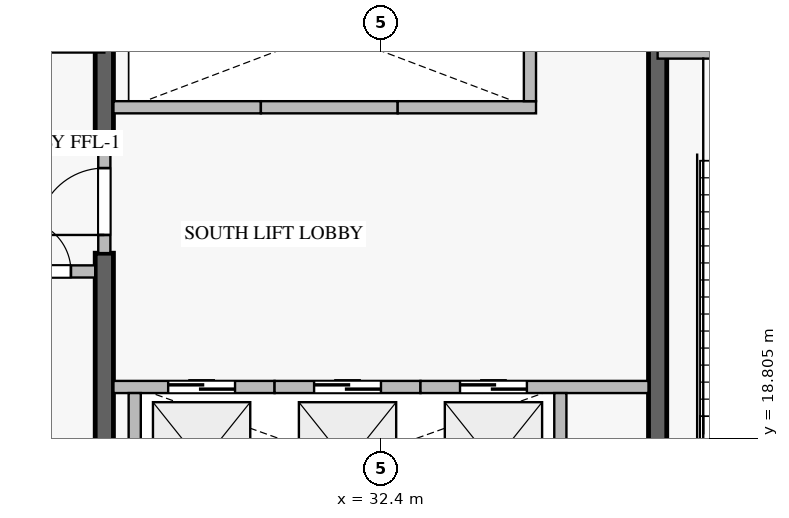
"""IFC4 building model, lengths in metres.
Left out: names, types, materials, properties, quantities, classifications, styles, units other than length and angle.
Written with IfcOpenShell. Run it as: python <this file> out.ifc"""

import sys

from ifc_helpers import new_model, si_unit, direction, frame, frame_2d, origin, place, context, subcontext, project, spatial, rectangle, extrude, source, transform, mapped, element, fill, save


model = new_model("IFC4")
c1 = context("Model", 3, precision=1e-05, world=origin(), true_north=direction((0.0, 1.0)))
c2 = subcontext(c1, "Body", "Model", "MODEL_VIEW")
j1 = project(units=[si_unit("LENGTHUNIT", "METRE"), si_unit("PLANEANGLEUNIT", "RADIAN")], contexts=[c1])
p1 = place(None, origin())
s1 = spatial("IfcSite", under=j1, at=p1, CompositionType="ELEMENT")
p2 = place(p1, origin())
s2 = spatial("IfcBuilding", under=s1, at=p2, CompositionType="ELEMENT")
p3 = place(p2, frame((0.0, 0.0, 109.2)))
s3 = spatial("IfcBuildingStorey", under=s2, at=p3, CompositionType="ELEMENT", Elevation=109.2)
p4 = place(p3, frame((27.85, 17.025, -0.36), z_axis=(0.0, 0.0, 1.0), x_axis=(0.0, 1.0, 0.0)))
e1 = element("IfcWall", 1, at=p4, inside=s3, PredefinedType="SHEAR", context=c2, shape_type="SweptSolid", body=[
    extrude(rectangle(XDim=4.825, YDim=0.3, at=frame_2d((2.413, 0.0))), origin(), (0.0, 0.0, 1.0), 5.998),
])
p5 = place(p3, frame((27.85, 23.55, -0.36), z_axis=(0.0, 0.0, 1.0), x_axis=(0.0, 1.0, 0.0)))
e2 = element("IfcWall", 2, at=p5, inside=s3, PredefinedType="SHEAR", context=c2, shape_type="SweptSolid", body=[
    extrude(rectangle(XDim=9.825, YDim=0.3, at=frame_2d((4.913, 0.0))), origin(), (0.0, 0.0, 1.0), 5.998),
])
p6 = place(p3, frame((36.95, 17.025, -0.36), z_axis=(0.0, 0.0, 1.0), x_axis=(0.0, 1.0, 0.0)))
e3 = element("IfcWall", 3, at=p6, inside=s3, PredefinedType="SHEAR", context=c2, shape_type="SweptSolid", body=[
    extrude(rectangle(XDim=8.325, YDim=0.3, at=frame_2d((4.163, 0.0))), origin(), (0.0, 0.0, 1.0), 5.998),
])
p7 = place(p3, frame((36.95, 25.15, 0.0), z_axis=(0.0, 0.0, 1.0), x_axis=(1.0, 0.0, 0.0)))
e4 = element("IfcWall", 4, at=p7, inside=s3, PredefinedType="STANDARD", context=c2, shape_type="SweptSolid", body=[
    extrude(rectangle(XDim=4.45, YDim=0.2, at=frame_2d((2.225, 0.0))), origin(), (0.0, 0.0, 1.0), 5.64),
])
p8 = place(p7, frame((1.65, 0.0, 0.0)))
e5 = element("IfcOpeningElement", 5, at=p8, cuts=e4, PredefinedType="OPENING", context=c2, shape_type="SweptSolid", body=[
    extrude(rectangle(XDim=1.1, YDim=2.15, at=frame_2d((0.55, 1.075))), frame((0.0, 0.11, 0.0), z_axis=(0.0, -1.0, 0.0), x_axis=(1.0, 0.0, 0.0)), (0.0, 0.0, 1.0), 0.22),
])
p9 = place(p3, frame((28.0, 19.65, 0.0), z_axis=(0.0, 0.0, 1.0), x_axis=(1.0, 0.0, 0.0)))
e6 = element("IfcWall", 6, at=p9, inside=s3, PredefinedType="STANDARD", context=c2, shape_type="SweptSolid", body=[
    extrude(rectangle(XDim=2.65, YDim=0.2, at=frame_2d((1.325, 0.0))), origin(), (0.0, 0.0, 1.0), 5.64),
])
p10 = place(p9, frame((0.9, 0.0, 0.0)))
e7 = element("IfcOpeningElement", 7, at=p10, cuts=e6, PredefinedType="OPENING", context=c2, shape_type="SweptSolid", body=[
    extrude(rectangle(XDim=1.1, YDim=2.2, at=frame_2d((0.55, 1.1))), frame((0.0, 0.11, 0.0), z_axis=(0.0, -1.0, 0.0), x_axis=(1.0, 0.0, 0.0)), (0.0, 0.0, 1.0), 0.22),
])
p11 = place(p3, frame((28.35, 17.025, 0.0), z_axis=(0.0, 0.0, 1.0), x_axis=(0.0, 1.0, 0.0)))
e8 = element("IfcWall", 8, at=p11, inside=s3, PredefinedType="STANDARD", context=c2, shape_type="SweptSolid", body=[
    extrude(rectangle(XDim=2.525, YDim=0.2, at=frame_2d((1.263, 0.0))), origin(), (0.0, 0.0, 1.0), 5.64),
])
p12 = place(p3, frame((30.65, 19.65, 0.0), z_axis=(0.0, 0.0, 1.0), x_axis=(1.0, 0.0, 0.0)))
e9 = element("IfcWall", 9, at=p12, inside=s3, PredefinedType="STANDARD", context=c2, shape_type="SweptSolid", body=[
    extrude(rectangle(XDim=2.4, YDim=0.2, at=frame_2d((1.2, 0.0))), origin(), (0.0, 0.0, 1.0), 5.64),
])
p13 = place(p12, frame((0.65, 0.0, 0.0)))
e10 = element("IfcOpeningElement", 10, at=p13, cuts=e9, PredefinedType="OPENING", context=c2, shape_type="SweptSolid", body=[
    extrude(rectangle(XDim=1.1, YDim=2.2, at=frame_2d((0.55, 1.1))), frame((0.0, 0.11, 0.0), z_axis=(0.0, -1.0, 0.0), x_axis=(1.0, 0.0, 0.0)), (0.0, 0.0, 1.0), 0.22),
])
p14 = place(p3, frame((33.05, 19.65, 0.0), z_axis=(0.0, 0.0, 1.0), x_axis=(1.0, 0.0, 0.0)))
e11 = element("IfcWall", 11, at=p14, inside=s3, PredefinedType="STANDARD", context=c2, shape_type="SweptSolid", body=[
    extrude(rectangle(XDim=3.75, YDim=0.2, at=frame_2d((1.875, 0.0))), origin(), (0.0, 0.0, 1.0), 5.64),
])
p15 = place(p14, frame((0.65, 0.0, 0.0)))
e12 = element("IfcOpeningElement", 12, at=p15, cuts=e11, PredefinedType="OPENING", context=c2, shape_type="SweptSolid", body=[
    extrude(rectangle(XDim=1.1, YDim=2.2, at=frame_2d((0.55, 1.1))), frame((0.0, 0.11, 0.0), z_axis=(0.0, -1.0, 0.0), x_axis=(1.0, 0.0, 0.0)), (0.0, 0.0, 1.0), 0.22),
])
p16 = place(p3, frame((35.35, 17.025, 0.0), z_axis=(0.0, 0.0, 1.0), x_axis=(0.0, 1.0, 0.0)))
e13 = element("IfcWall", 13, at=p16, inside=s3, PredefinedType="STANDARD", context=c2, shape_type="SweptSolid", body=[
    extrude(rectangle(XDim=2.525, YDim=0.2, at=frame_2d((1.263, 0.0))), origin(), (0.0, 0.0, 1.0), 5.64),
])
p17 = place(p3, frame((28.0, 24.25, 0.0), z_axis=(0.0, 0.0, 1.0), x_axis=(1.0, 0.0, 0.0)))
e14 = element("IfcWall", 14, at=p17, inside=s3, PredefinedType="STANDARD", context=c2, shape_type="SweptSolid", body=[
    extrude(rectangle(XDim=2.425, YDim=0.2, at=frame_2d((1.212, 0.0))), origin(), (0.0, 0.0, 1.0), 5.64),
])
p18 = place(p3, frame((30.425, 24.25, 0.0), z_axis=(0.0, 0.0, 1.0), x_axis=(1.0, 0.0, 0.0)))
e15 = element("IfcWall", 15, at=p18, inside=s3, PredefinedType="STANDARD", context=c2, shape_type="SweptSolid", body=[
    extrude(rectangle(XDim=2.25, YDim=0.2, at=frame_2d((1.125, 0.0))), origin(), (0.0, 0.0, 1.0), 5.64),
])
p19 = place(p3, frame((32.675, 24.25, 0.0), z_axis=(0.0, 0.0, 1.0), x_axis=(1.0, 0.0, 0.0)))
e16 = element("IfcWall", 16, at=p19, inside=s3, PredefinedType="STANDARD", context=c2, shape_type="SweptSolid", body=[
    extrude(rectangle(XDim=2.275, YDim=0.2, at=frame_2d((1.137, 0.0))), origin(), (0.0, 0.0, 1.0), 5.64),
])
p20 = place(p3, frame((34.85, 24.35, 0.0), z_axis=(0.0, 0.0, 1.0), x_axis=(0.0, 1.0, 0.0)))
e17 = element("IfcWall", 17, at=p20, inside=s3, PredefinedType="STANDARD", context=c2, shape_type="SweptSolid", body=[
    extrude(rectangle(XDim=2.5, YDim=0.2, at=frame_2d((1.25, 0.0))), origin(), (0.0, 0.0, 1.0), 5.64),
])
p21 = place(p3, frame((26.052, 21.55, 0.0), z_axis=(0.0, 0.0, 1.0), x_axis=(1.0, 0.0, 0.0)))
e18 = element("IfcWall", 18, at=p21, inside=s3, PredefinedType="STANDARD", context=c2, shape_type="SweptSolid", body=[
    extrude(rectangle(XDim=1.648, YDim=0.2, at=frame_2d((0.824, 0.0))), origin(), (0.0, 0.0, 1.0), 5.64),
])
p22 = place(p21, frame((0.399, 0.0, 0.0)))
e19 = element("IfcOpeningElement", 19, at=p22, cuts=e18, PredefinedType="OPENING", context=c2, shape_type="SweptSolid", body=[
    extrude(rectangle(XDim=0.85, YDim=2.1, at=frame_2d((0.425, 1.05))), frame((0.0, 0.11, 0.0), z_axis=(0.0, -1.0, 0.0), x_axis=(1.0, 0.0, 0.0)), (0.0, 0.0, 1.0), 0.22),
])
p23 = place(p3, frame((27.85, 21.852, 0.0), z_axis=(0.0, 0.0, 1.0), x_axis=(0.0, 1.0, 0.0)))
e20 = element("IfcWall", 20, at=p23, inside=s3, PredefinedType="STANDARD", context=c2, shape_type="SweptSolid", body=[
    extrude(rectangle(XDim=1.696, YDim=0.2, at=frame_2d((0.848, 0.0))), origin(), (0.0, 0.0, 1.0), 5.64),
])
p24 = place(p23, frame((0.298, 0.0, 0.0)))
e21 = element("IfcOpeningElement", 21, at=p24, cuts=e20, PredefinedType="OPENING", context=c2, shape_type="SweptSolid", body=[
    extrude(rectangle(XDim=1.1, YDim=2.15, at=frame_2d((0.55, 1.075))), frame((0.0, 0.11, 0.0), z_axis=(0.0, -1.0, 0.0), x_axis=(1.0, 0.0, 0.0)), (0.0, 0.0, 1.0), 0.22),
])
m1 = source(origin(), c2, "Body", "SweptSolid", [
    extrude(rectangle(XDim=1.1, YDim=2.2, at=frame_2d((0.55, 1.1))), frame((0.0, 0.025, 0.0), z_axis=(0.0, -1.0, 0.0), x_axis=(1.0, 0.0, 0.0)), (0.0, 0.0, 1.0), 0.05),
])
p25 = place(p10, origin())
e22 = element("IfcDoor", 22, at=p25, inside=s3, OperationType="DOUBLE_DOOR_SLIDING", PredefinedType="DOOR", context=c2, shape_type="MappedRepresentation", body=[
    mapped(m1, transform((0.0, 0.0, 0.0), scale=1.0)),
])
fill(e7, e22)
p26 = place(p13, origin())
e23 = element("IfcDoor", 23, at=p26, inside=s3, OperationType="DOUBLE_DOOR_SLIDING", PredefinedType="DOOR", context=c2, shape_type="MappedRepresentation", body=[
    mapped(m1, transform((0.0, 0.0, 0.0), scale=1.0)),
])
fill(e10, e23)
p27 = place(p15, origin())
e24 = element("IfcDoor", 24, at=p27, inside=s3, OperationType="DOUBLE_DOOR_SLIDING", PredefinedType="DOOR", context=c2, shape_type="MappedRepresentation", body=[
    mapped(m1, transform((0.0, 0.0, 0.0), scale=1.0)),
])
fill(e12, e24)
m2 = source(origin(), c2, "Body", "SweptSolid", [
    extrude(rectangle(XDim=0.85, YDim=2.1, at=frame_2d((0.425, 1.05))), frame((0.0, 0.025, 0.0), z_axis=(0.0, -1.0, 0.0), x_axis=(1.0, 0.0, 0.0)), (0.0, 0.0, 1.0), 0.05),
])
p28 = place(p22, origin())
e25 = element("IfcDoor", 25, at=p28, inside=s3, OperationType="SINGLE_SWING_LEFT", PredefinedType="DOOR", context=c2, shape_type="MappedRepresentation", body=[
    mapped(m2, transform((0.0, 0.0, 0.0), scale=1.0)),
])
fill(e19, e25)
m3 = source(origin(), c2, "Body", "SweptSolid", [
    extrude(rectangle(XDim=1.1, YDim=2.15, at=frame_2d((0.55, 1.075))), frame((0.0, 0.025, 0.0), z_axis=(0.0, -1.0, 0.0), x_axis=(1.0, 0.0, 0.0)), (0.0, 0.0, 1.0), 0.05),
])
p29 = place(p24, origin())
e26 = element("IfcDoor", 26, at=p29, inside=s3, OperationType="SINGLE_SWING_LEFT", PredefinedType="DOOR", context=c2, shape_type="MappedRepresentation", body=[
    mapped(m3, transform((0.0, 0.0, 0.0), scale=1.0)),
])
fill(e21, e26)
save(model, sys.argv[1])
